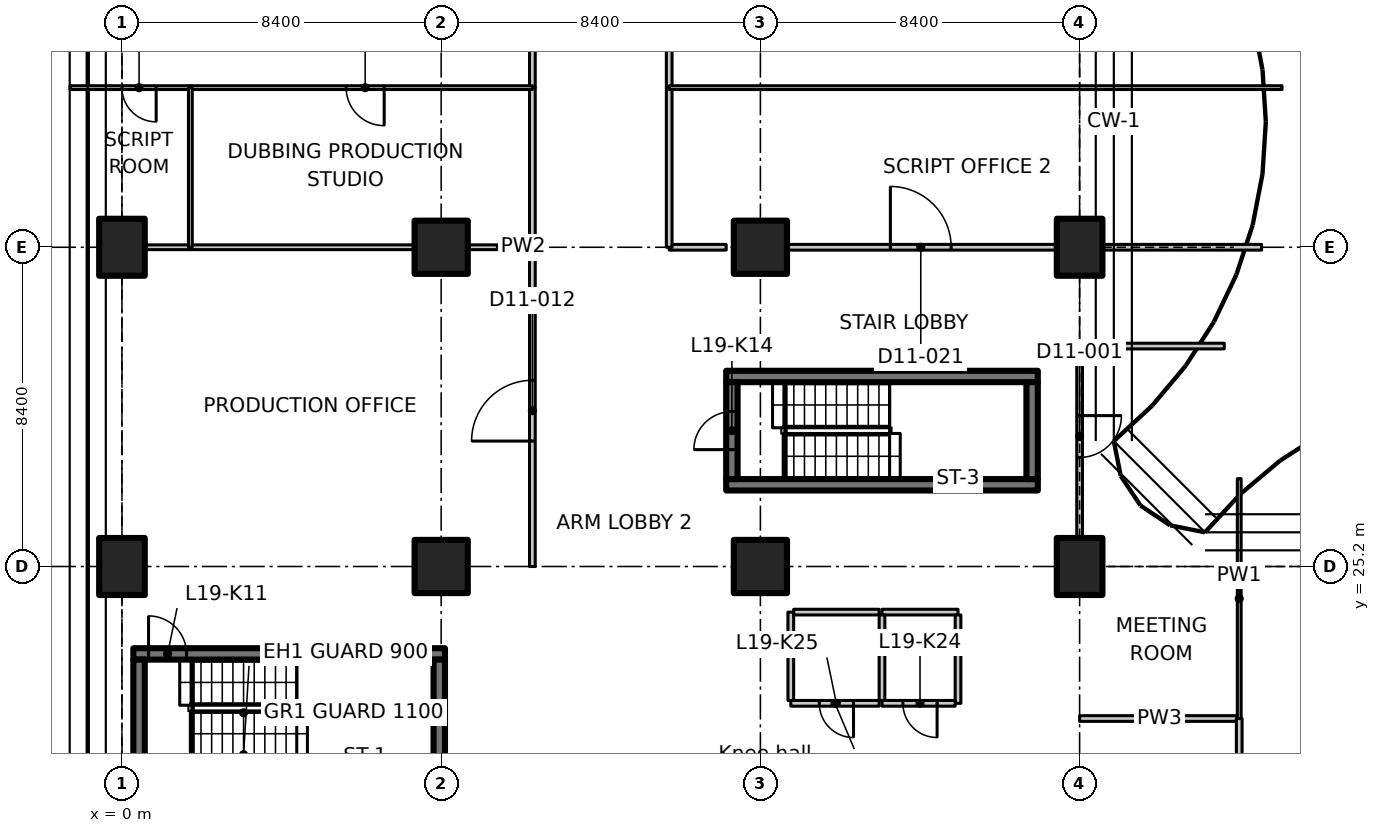
"""IFC4 building model, lengths in metres.
Left out: names, types, materials, properties, quantities, classifications, styles, units other than length and angle.
Written with IfcOpenShell. Run it as: python <this file> out.ifc"""

import sys

from ifc_helpers import new_model, si_unit, direction, frame, frame_2d, origin, origin_2d, place, context, subcontext, project, spatial, polyline, rectangle, outline, extrude, element, fill, save


model = new_model("IFC4")
c1 = context("Model", 3, precision=1e-05, world=origin(), true_north=direction((0.0, 1.0)))
c2 = subcontext(c1, "Body", "Model", "MODEL_VIEW")
j1 = project(units=[si_unit("LENGTHUNIT", "METRE"), si_unit("PLANEANGLEUNIT", "RADIAN")], contexts=[c1])
p1 = place(None, origin())
s1 = spatial("IfcSite", under=j1, at=p1, CompositionType="ELEMENT")
p2 = place(p1, origin())
s2 = spatial("IfcBuilding", under=s1, at=p2, CompositionType="ELEMENT")
p3 = place(p2, frame((0.0, 0.0, 83.3)))
s3 = spatial("IfcBuildingStorey", under=s2, at=p3, CompositionType="ELEMENT", Elevation=83.3)
for number, where, z_axis, x_axis in (
    (1, (0.0, 25.2, 0.0), (0.0, 0.0, 1.0), (1.0, 0.0, 0.0)),
    (2, (0.0, 33.6, 0.0), (0.0, 0.0, 1.0), (1.0, 0.0, 0.0)),
):
    element("IfcColumn", number, at=place(p3, frame(where, z_axis=z_axis, x_axis=x_axis)), inside=s3, PredefinedType="COLUMN", context=c2, shape_type="SweptSolid", body=[
        extrude(rectangle(XDim=1.2, YDim=1.5, at=origin_2d()), origin(), (0.0, 0.0, 1.0), 3.3),
    ])
for number, where, z_axis, x_axis in (
    (3, (8.4, 25.2, 0.0), (0.0, 0.0, 1.0), (1.0, 0.0, 0.0)),
    (4, (8.4, 33.6, 0.0), (0.0, 0.0, 1.0), (1.0, 0.0, 0.0)),
    (5, (16.8, 25.2, 0.0), (0.0, 0.0, 1.0), (1.0, 0.0, 0.0)),
    (6, (16.8, 33.6, 0.0), (0.0, 0.0, 1.0), (1.0, 0.0, 0.0)),
):
    element("IfcColumn", number, at=place(p3, frame(where, z_axis=z_axis, x_axis=x_axis)), inside=s3, PredefinedType="COLUMN", context=c2, shape_type="SweptSolid", body=[
        extrude(rectangle(XDim=1.4, YDim=1.4, at=origin_2d()), origin(), (0.0, 0.0, 1.0), 3.3),
    ])
for number, where, z_axis, x_axis in (
    (7, (25.2, 25.2, 0.0), (0.0, 0.0, 1.0), (1.0, 0.0, 0.0)),
    (8, (25.2, 33.6, 0.0), (0.0, 0.0, 1.0), (1.0, 0.0, 0.0)),
):
    element("IfcColumn", number, at=place(p3, frame(where, z_axis=z_axis, x_axis=x_axis)), inside=s3, PredefinedType="COLUMN", context=c2, shape_type="SweptSolid", body=[
        extrude(rectangle(XDim=1.2, YDim=1.5, at=origin_2d()), origin(), (0.0, 0.0, 1.0), 3.3),
    ])
p4 = place(p3, frame((0.3, 22.9, 0.0), z_axis=(0.0, 0.0, 1.0), x_axis=(1.0, 0.0, 0.0)))
e9 = element("IfcWall", 9, at=p4, inside=s3, PredefinedType="SHEAR", context=c2, shape_type="SweptSolid", body=[
    extrude(rectangle(XDim=8.2, YDim=0.3, at=frame_2d((4.1, 0.0))), origin(), (0.0, 0.0, 1.0), 3.3),
])
p5 = place(p4, frame((0.4, 0.0, 0.0)))
e10 = element("IfcOpeningElement", 10, at=p5, cuts=e9, PredefinedType="OPENING", context=c2, shape_type="SweptSolid", body=[
    extrude(rectangle(XDim=1.0, YDim=2.1, at=frame_2d((0.5, 1.05))), frame((0.0, 0.16, 0.0), z_axis=(0.0, -1.0, 0.0), x_axis=(1.0, 0.0, 0.0)), (0.0, 0.0, 1.0), 0.32),
])
for number, where, z_axis, x_axis in (
    (11, (0.45, 20.2, 0.0), (0.0, 0.0, 1.0), (0.0, 1.0, 0.0)),
    (12, (8.35, 20.2, 0.0), (0.0, 0.0, 1.0), (0.0, 1.0, 0.0)),
):
    element("IfcWall", number, at=place(p3, frame(where, z_axis=z_axis, x_axis=x_axis)), inside=s3, PredefinedType="SHEAR", context=c2, shape_type="SweptSolid", body=[
        extrude(rectangle(XDim=2.55, YDim=0.3, at=frame_2d((1.275, 0.0))), origin(), (0.0, 0.0, 1.0), 3.3),
    ])
for number, where, z_axis, x_axis in (
    (13, (15.9, 27.35, 0.0), (0.0, 0.0, 1.0), (1.0, 0.0, 0.0)),
    (14, (15.9, 30.2, 0.0), (0.0, 0.0, 1.0), (1.0, 0.0, 0.0)),
):
    element("IfcWall", number, at=place(p3, frame(where, z_axis=z_axis, x_axis=x_axis)), inside=s3, PredefinedType="SHEAR", context=c2, shape_type="SweptSolid", body=[
        extrude(rectangle(XDim=8.2, YDim=0.3, at=frame_2d((4.1, 0.0))), origin(), (0.0, 0.0, 1.0), 3.3),
    ])
p6 = place(p3, frame((16.05, 27.5, 0.0), z_axis=(0.0, 0.0, 1.0), x_axis=(0.0, 1.0, 0.0)))
e15 = element("IfcWall", 15, at=p6, inside=s3, PredefinedType="SHEAR", context=c2, shape_type="SweptSolid", body=[
    extrude(rectangle(XDim=2.55, YDim=0.3, at=frame_2d((1.275, 0.0))), origin(), (0.0, 0.0, 1.0), 3.3),
])
p7 = place(p6, frame((0.775, 0.0, 0.0)))
e16 = element("IfcOpeningElement", 16, at=p7, cuts=e15, PredefinedType="OPENING", context=c2, shape_type="SweptSolid", body=[
    extrude(rectangle(XDim=1.0, YDim=2.1, at=frame_2d((0.5, 1.05))), frame((0.0, 0.16, 0.0), z_axis=(0.0, -1.0, 0.0), x_axis=(1.0, 0.0, 0.0)), (0.0, 0.0, 1.0), 0.32),
])
p8 = place(p3, frame((23.95, 27.5, 0.0), z_axis=(0.0, 0.0, 1.0), x_axis=(0.0, 1.0, 0.0)))
e17 = element("IfcWall", 17, at=p8, inside=s3, PredefinedType="SHEAR", context=c2, shape_type="SweptSolid", body=[
    extrude(rectangle(XDim=2.55, YDim=0.3, at=frame_2d((1.275, 0.0))), origin(), (0.0, 0.0, 1.0), 3.3),
])
p9 = place(p3, frame((20.0, 24.0, 0.0), z_axis=(0.0, 0.0, 1.0), x_axis=(1.0, 0.0, 0.0)))
e18 = element("IfcWall", 18, at=p9, inside=s3, PredefinedType="PARTITIONING", context=c2, shape_type="SweptSolid", body=[
    extrude(rectangle(XDim=2.0, YDim=0.15, at=frame_2d((1.0, 0.0))), origin(), (0.0, 0.0, 1.0), 3.3),
])
p10 = place(p3, frame((22.0, 23.925, 0.0), z_axis=(0.0, 0.0, 1.0), x_axis=(0.0, -1.0, 0.0)))
e19 = element("IfcWall", 19, at=p10, inside=s3, PredefinedType="PARTITIONING", context=c2, shape_type="SweptSolid", body=[
    extrude(rectangle(XDim=2.325, YDim=0.15, at=frame_2d((1.163, 0.0))), origin(), (0.0, 0.0, 1.0), 3.3),
])
p11 = place(p3, frame((21.925, 21.6, 0.0), z_axis=(0.0, 0.0, 1.0), x_axis=(-1.0, 0.0, 0.0)))
e20 = element("IfcWall", 20, at=p11, inside=s3, PredefinedType="PARTITIONING", context=c2, shape_type="SweptSolid", body=[
    extrude(rectangle(XDim=1.925, YDim=0.15, at=frame_2d((0.962, 0.0))), origin(), (0.0, 0.0, 1.0), 3.3),
])
p12 = place(p11, frame((0.475, 0.0, 0.0)))
e21 = element("IfcOpeningElement", 21, at=p12, cuts=e20, PredefinedType="OPENING", context=c2, shape_type="SweptSolid", body=[
    extrude(rectangle(XDim=0.9, YDim=2.1, at=frame_2d((0.45, 1.05))), frame((0.0, 0.085, 0.0), z_axis=(0.0, -1.0, 0.0), x_axis=(1.0, 0.0, 0.0)), (0.0, 0.0, 1.0), 0.17),
])
p13 = place(p3, frame((20.0, 21.675, 0.0), z_axis=(0.0, 0.0, 1.0), x_axis=(0.0, 1.0, 0.0)))
e22 = element("IfcWall", 22, at=p13, inside=s3, PredefinedType="PARTITIONING", context=c2, shape_type="SweptSolid", body=[
    extrude(rectangle(XDim=2.25, YDim=0.15, at=frame_2d((1.125, 0.0))), origin(), (0.0, 0.0, 1.0), 3.3),
])
p14 = place(p3, frame((19.925, 21.6, 0.0), z_axis=(0.0, 0.0, 1.0), x_axis=(-1.0, 0.0, 0.0)))
e23 = element("IfcWall", 23, at=p14, inside=s3, PredefinedType="PARTITIONING", context=c2, shape_type="SweptSolid", body=[
    extrude(rectangle(XDim=2.325, YDim=0.15, at=frame_2d((1.163, 0.0))), origin(), (0.0, 0.0, 1.0), 3.3),
])
p15 = place(p14, frame((0.675, 0.0, 0.0)))
e24 = element("IfcOpeningElement", 24, at=p15, cuts=e23, PredefinedType="OPENING", context=c2, shape_type="SweptSolid", body=[
    extrude(rectangle(XDim=0.9, YDim=2.1, at=frame_2d((0.45, 1.05))), frame((0.0, 0.085, 0.0), z_axis=(0.0, -1.0, 0.0), x_axis=(1.0, 0.0, 0.0)), (0.0, 0.0, 1.0), 0.17),
])
p16 = place(p3, frame((17.6, 21.675, 0.0), z_axis=(0.0, 0.0, 1.0), x_axis=(0.0, 1.0, 0.0)))
e25 = element("IfcWall", 25, at=p16, inside=s3, PredefinedType="PARTITIONING", context=c2, shape_type="SweptSolid", body=[
    extrude(rectangle(XDim=2.325, YDim=0.15, at=frame_2d((1.163, 0.0))), origin(), (0.0, 0.0, 1.0), 3.3),
])
p17 = place(p3, frame((17.675, 24.0, 0.0), z_axis=(0.0, 0.0, 1.0), x_axis=(1.0, 0.0, 0.0)))
e26 = element("IfcWall", 26, at=p17, inside=s3, PredefinedType="PARTITIONING", context=c2, shape_type="SweptSolid", body=[
    extrude(rectangle(XDim=2.25, YDim=0.15, at=frame_2d((1.125, 0.0))), origin(), (0.0, 0.0, 1.0), 3.3),
])
p18 = place(p3, frame((25.2, 21.2, 0.0), z_axis=(0.0, 0.0, 1.0), x_axis=(1.0, 0.0, 0.0)))
e27 = element("IfcWall", 27, at=p18, inside=s3, PredefinedType="PARTITIONING", context=c2, shape_type="SweptSolid", body=[
    extrude(rectangle(XDim=4.2, YDim=0.15, at=frame_2d((2.1, 0.0))), origin(), (0.0, 0.0, 1.0), 3.28),
])
p19 = place(p3, frame((29.4, 21.2, 0.0), z_axis=(0.0, 0.0, 1.0), x_axis=(0.0, -1.0, 0.0)))
e28 = element("IfcWall", 28, at=p19, inside=s3, PredefinedType="PARTITIONING", context=c2, shape_type="SweptSolid", body=[
    extrude(rectangle(XDim=8.2, YDim=0.15, at=frame_2d((4.1, 0.0))), origin(), (0.0, 0.0, 1.0), 3.28),
])
p20 = place(p3, frame((29.4, 27.511, 0.0), z_axis=(0.0, 0.0, 1.0), x_axis=(0.0, -1.0, 0.0)))
e29 = element("IfcWall", 29, at=p20, inside=s3, PredefinedType="PARTITIONING", context=c2, shape_type="SweptSolid", body=[
    extrude(outline(polyline([(0.0, 0.0), (6.311, 0.0), (6.311, 3.28), (2.761, 3.28), (2.759, 2.93), (1.863, 2.93), (1.861, 3.28), (0.236, 3.28), (0.0, 3.28), (0.0, 0.0)])), frame((0.0, 0.05, 0.0), z_axis=(0.0, -1.0, 0.0), x_axis=(1.0, 0.0, 0.0)), (0.0, 0.0, 1.0), 0.1),
])
p21 = place(p3, frame((25.2, 31.0, 0.0), z_axis=(0.0, 0.0, 1.0), x_axis=(0.0, -1.0, 0.0)))
e30 = element("IfcWall", 30, at=p21, inside=s3, PredefinedType="PARTITIONING", context=c2, shape_type="SweptSolid", body=[
    extrude(outline(polyline([(0.0, 0.0), (5.03, 0.0), (5.03, 2.93), (0.0, 2.93), (0.0, 0.0)])), frame((0.0, 0.075, 0.0), z_axis=(0.0, -1.0, 0.0), x_axis=(1.0, 0.0, 0.0)), (0.0, 0.0, 1.0), 0.15),
])
p22 = place(p21, frame((1.83, 0.0, 0.0)))
e31 = element("IfcOpeningElement", 31, at=p22, cuts=e30, PredefinedType="OPENING", context=c2, shape_type="SweptSolid", body=[
    extrude(rectangle(XDim=1.1, YDim=2.1, at=frame_2d((0.55, 1.05))), frame((0.0, 0.085, 0.0), z_axis=(0.0, -1.0, 0.0), x_axis=(1.0, 0.0, 0.0)), (0.0, 0.0, 1.0), 0.17),
])
p23 = place(p3, frame((25.2, 31.0, 0.0), z_axis=(0.0, 0.0, 1.0), x_axis=(1.0, 0.0, 0.0)))
e32 = element("IfcWall", 32, at=p23, inside=s3, PredefinedType="PARTITIONING", context=c2, shape_type="SweptSolid", body=[
    extrude(rectangle(XDim=3.806, YDim=0.15, at=frame_2d((1.903, 0.0))), origin(), (0.0, 0.0, 1.0), 2.93),
])
p24 = place(p3, frame((10.8, 25.2, 0.0), z_axis=(0.0, 0.0, 1.0), x_axis=(0.0, 1.0, 0.0)))
e33 = element("IfcWall", 33, at=p24, inside=s3, PredefinedType="PARTITIONING", context=c2, shape_type="SweptSolid", body=[
    extrude(rectangle(XDim=8.4, YDim=0.15, at=frame_2d((4.2, 0.0))), origin(), (0.0, 0.0, 1.0), 3.28),
])
p25 = place(p24, frame((3.3, 0.0, 0.0)))
e34 = element("IfcOpeningElement", 34, at=p25, cuts=e33, PredefinedType="OPENING", context=c2, shape_type="SweptSolid", body=[
    extrude(rectangle(XDim=1.6, YDim=2.1, at=frame_2d((0.8, 1.05))), frame((0.0, 0.085, 0.0), z_axis=(0.0, -1.0, 0.0), x_axis=(1.0, 0.0, 0.0)), (0.0, 0.0, 1.0), 0.17),
])
p26 = place(p3, frame((14.4, 33.6, 0.0), z_axis=(0.0, 0.0, 1.0), x_axis=(1.0, 0.0, 0.0)))
e35 = element("IfcWall", 35, at=p26, inside=s3, PredefinedType="PARTITIONING", context=c2, shape_type="SweptSolid", body=[
    extrude(rectangle(XDim=1.5, YDim=0.15, at=frame_2d((0.75, 0.0))), origin(), (0.0, 0.0, 1.0), 3.28),
])
p27 = place(p3, frame((17.52, 33.6, 0.0), z_axis=(0.0, 0.0, 1.0), x_axis=(1.0, 0.0, 0.0)))
e36 = element("IfcWall", 36, at=p27, inside=s3, PredefinedType="PARTITIONING", context=c2, shape_type="SweptSolid", body=[
    extrude(rectangle(XDim=7.06, YDim=0.15, at=frame_2d((3.53, 0.0))), origin(), (0.0, 0.0, 1.0), 3.28),
])
p28 = place(p27, frame((2.7, 0.0, 0.0)))
e37 = element("IfcOpeningElement", 37, at=p28, cuts=e36, PredefinedType="OPENING", context=c2, shape_type="SweptSolid", body=[
    extrude(rectangle(XDim=1.6, YDim=2.1, at=frame_2d((0.8, 1.05))), frame((0.0, 0.085, 0.0), z_axis=(0.0, -1.0, 0.0), x_axis=(1.0, 0.0, 0.0)), (0.0, 0.0, 1.0), 0.17),
])
p29 = place(p3, frame((25.82, 33.6, 0.0), z_axis=(0.0, 0.0, 1.0), x_axis=(1.0, 0.0, 0.0)))
e38 = element("IfcWall", 38, at=p29, inside=s3, PredefinedType="PARTITIONING", context=c2, shape_type="SweptSolid", body=[
    extrude(rectangle(XDim=4.168, YDim=0.15, at=frame_2d((2.084, 0.0))), origin(), (0.0, 0.0, 1.0), 2.93),
])
p30 = place(p3, frame((10.8, 37.8, 0.0), z_axis=(0.0, 0.0, 1.0), x_axis=(0.0, 1.0, 0.0)))
e39 = element("IfcWall", 39, at=p30, inside=s3, PredefinedType="PARTITIONING", context=c2, shape_type="SweptSolid", body=[
    extrude(rectangle(XDim=8.4, YDim=0.15, at=frame_2d((4.2, 0.0))), origin(), (0.0, 0.0, 1.0), 3.28),
])
p31 = place(p30, frame((3.3, 0.0, 0.0)))
e40 = element("IfcOpeningElement", 40, at=p31, cuts=e39, PredefinedType="OPENING", context=c2, shape_type="SweptSolid", body=[
    extrude(rectangle(XDim=1.6, YDim=2.1, at=frame_2d((0.8, 1.05))), frame((0.0, 0.085, 0.0), z_axis=(0.0, -1.0, 0.0), x_axis=(1.0, 0.0, 0.0)), (0.0, 0.0, 1.0), 0.17),
])
for number, where, z_axis, x_axis in (
    (41, (10.8, 33.6, 0.0), (0.0, 0.0, 1.0), (0.0, 1.0, 0.0)),
    (42, (14.4, 37.8, 0.0), (0.0, 0.0, 1.0), (0.0, -1.0, 0.0)),
):
    element("IfcWall", number, at=place(p3, frame(where, z_axis=z_axis, x_axis=x_axis)), inside=s3, PredefinedType="PARTITIONING", context=c2, shape_type="SweptSolid", body=[
        extrude(rectangle(XDim=4.2, YDim=0.15, at=frame_2d((2.1, 0.0))), origin(), (0.0, 0.0, 1.0), 3.28),
    ])
p32 = place(p3, frame((14.4, 54.6, 0.0), z_axis=(0.0, 0.0, 1.0), x_axis=(0.0, -1.0, 0.0)))
e43 = element("IfcWall", 43, at=p32, inside=s3, PredefinedType="PARTITIONING", context=c2, shape_type="SweptSolid", body=[
    extrude(rectangle(XDim=16.8, YDim=0.15, at=frame_2d((8.4, 0.0))), origin(), (0.0, 0.0, 1.0), 3.28),
])
p33 = place(p32, frame((7.5, 0.0, 0.0)))
e44 = element("IfcOpeningElement", 44, at=p33, cuts=e43, PredefinedType="OPENING", context=c2, shape_type="SweptSolid", body=[
    extrude(rectangle(XDim=2.0, YDim=2.4, at=frame_2d((1.0, 1.2))), frame((0.0, 0.085, 0.0), z_axis=(0.0, -1.0, 0.0), x_axis=(1.0, 0.0, 0.0)), (0.0, 0.0, 1.0), 0.17),
])
p34 = place(p3, frame((0.62, 33.6, 0.0), z_axis=(0.0, 0.0, 1.0), x_axis=(1.0, 0.0, 0.0)))
e45 = element("IfcWall", 45, at=p34, inside=s3, PredefinedType="PARTITIONING", context=c2, shape_type="SweptSolid", body=[
    extrude(rectangle(XDim=1.18, YDim=0.125, at=frame_2d((0.59, 0.0))), origin(), (0.0, 0.0, 1.0), 3.28),
])
p35 = place(p3, frame((1.8, 33.6, 0.0), z_axis=(0.0, 0.0, 1.0), x_axis=(1.0, 0.0, 0.0)))
e46 = element("IfcWall", 46, at=p35, inside=s3, PredefinedType="PARTITIONING", context=c2, shape_type="SweptSolid", body=[
    extrude(rectangle(XDim=5.88, YDim=0.125, at=frame_2d((2.94, 0.0))), origin(), (0.0, 0.0, 1.0), 3.28),
])
p36 = place(p3, frame((9.12, 33.6, 0.0), z_axis=(0.0, 0.0, 1.0), x_axis=(1.0, 0.0, 0.0)))
e47 = element("IfcWall", 47, at=p36, inside=s3, PredefinedType="PARTITIONING", context=c2, shape_type="SweptSolid", body=[
    extrude(rectangle(XDim=1.68, YDim=0.125, at=frame_2d((0.84, 0.0))), origin(), (0.0, 0.0, 1.0), 3.28),
])
p37 = place(p3, frame((1.8, 37.8, 0.0), z_axis=(0.0, 0.0, 1.0), x_axis=(-1.0, 0.0, 0.0)))
e48 = element("IfcWall", 48, at=p37, inside=s3, PredefinedType="PARTITIONING", context=c2, shape_type="SweptSolid", body=[
    extrude(rectangle(XDim=3.165, YDim=0.1, at=frame_2d((1.583, 0.0))), origin(), (0.0, 0.0, 1.0), 2.93),
])
p38 = place(p37, frame((0.9, 0.0, 0.0)))
e49 = element("IfcOpeningElement", 49, at=p38, cuts=e48, PredefinedType="OPENING", context=c2, shape_type="SweptSolid", body=[
    extrude(rectangle(XDim=0.9, YDim=2.1, at=frame_2d((0.45, 1.05))), frame((0.0, 0.06, 0.0), z_axis=(0.0, -1.0, 0.0), x_axis=(1.0, 0.0, 0.0)), (0.0, 0.0, 1.0), 0.12),
])
p39 = place(p3, frame((10.8, 37.8, 0.0), z_axis=(0.0, 0.0, 1.0), x_axis=(-1.0, 0.0, 0.0)))
e50 = element("IfcWall", 50, at=p39, inside=s3, PredefinedType="PARTITIONING", context=c2, shape_type="SweptSolid", body=[
    extrude(rectangle(XDim=9.0, YDim=0.1, at=frame_2d((4.5, 0.0))), origin(), (0.0, 0.0, 1.0), 3.28),
])
p40 = place(p39, frame((3.9, 0.0, 0.0)))
e51 = element("IfcOpeningElement", 51, at=p40, cuts=e50, PredefinedType="OPENING", context=c2, shape_type="SweptSolid", body=[
    extrude(rectangle(XDim=1.0, YDim=2.1, at=frame_2d((0.5, 1.05))), frame((0.0, 0.06, 0.0), z_axis=(0.0, -1.0, 0.0), x_axis=(1.0, 0.0, 0.0)), (0.0, 0.0, 1.0), 0.12),
])
p41 = place(p3, frame((1.8, 37.8, 0.0), z_axis=(0.0, 0.0, 1.0), x_axis=(0.0, -1.0, 0.0)))
e52 = element("IfcWall", 52, at=p41, inside=s3, PredefinedType="PARTITIONING", context=c2, shape_type="SweptSolid", body=[
    extrude(rectangle(XDim=4.2, YDim=0.1, at=frame_2d((2.1, 0.0))), origin(), (0.0, 0.0, 1.0), 3.28),
])
p42 = place(p3, frame((14.4, 37.8, 0.0), z_axis=(0.0, 0.0, 1.0), x_axis=(1.0, 0.0, 0.0)))
e53 = element("IfcWall", 53, at=p42, inside=s3, PredefinedType="PARTITIONING", context=c2, shape_type="SweptSolid", body=[
    extrude(outline(polyline([(0.0, 0.0), (16.126, 0.0), (16.126, 3.28), (15.843, 3.28), (11.25, 3.28), (11.248, 2.93), (10.352, 2.93), (10.35, 3.28), (0.0, 3.28), (0.0, 0.0)])), frame((0.0, 0.05, 0.0), z_axis=(0.0, -1.0, 0.0), x_axis=(1.0, 0.0, 0.0)), (0.0, 0.0, 1.0), 0.1),
])
p43 = place(p5, origin())
e54 = element("IfcDoor", 54, at=p43, inside=s3, OperationType="SINGLE_SWING_LEFT", PredefinedType="DOOR", context=c2, shape_type="SweptSolid", body=[
    extrude(rectangle(XDim=1.0, YDim=2.1, at=frame_2d((0.5, 1.05))), frame((0.0, 0.025, 0.0), z_axis=(0.0, -1.0, 0.0), x_axis=(1.0, 0.0, 0.0)), (0.0, 0.0, 1.0), 0.05),
])
fill(e10, e54)
p44 = place(p7, origin())
e55 = element("IfcDoor", 55, at=p44, inside=s3, OperationType="SINGLE_SWING_RIGHT", PredefinedType="DOOR", context=c2, shape_type="SweptSolid", body=[
    extrude(rectangle(XDim=1.0, YDim=2.1, at=frame_2d((0.5, 1.05))), frame((0.0, 0.025, 0.0), z_axis=(0.0, -1.0, 0.0), x_axis=(1.0, 0.0, 0.0)), (0.0, 0.0, 1.0), 0.05),
])
fill(e16, e55)
p45 = place(p12, origin())
e56 = element("IfcDoor", 56, at=p45, inside=s3, OperationType="SINGLE_SWING_RIGHT", PredefinedType="DOOR", context=c2, shape_type="SweptSolid", body=[
    extrude(rectangle(XDim=0.9, YDim=2.1, at=frame_2d((0.45, 1.05))), frame((0.0, 0.025, 0.0), z_axis=(0.0, -1.0, 0.0), x_axis=(1.0, 0.0, 0.0)), (0.0, 0.0, 1.0), 0.05),
])
fill(e21, e56)
p46 = place(p15, origin())
e57 = element("IfcDoor", 57, at=p46, inside=s3, OperationType="SINGLE_SWING_LEFT", PredefinedType="DOOR", context=c2, shape_type="SweptSolid", body=[
    extrude(rectangle(XDim=0.9, YDim=2.1, at=frame_2d((0.45, 1.05))), frame((0.0, 0.025, 0.0), z_axis=(0.0, -1.0, 0.0), x_axis=(1.0, 0.0, 0.0)), (0.0, 0.0, 1.0), 0.05),
])
fill(e24, e57)
p47 = place(p22, origin())
e58 = element("IfcDoor", 58, at=p47, inside=s3, OperationType="SINGLE_SWING_RIGHT", PredefinedType="DOOR", context=c2, shape_type="SweptSolid", body=[
    extrude(rectangle(XDim=1.1, YDim=2.1, at=frame_2d((0.55, 1.05))), frame((0.0, 0.025, 0.0), z_axis=(0.0, -1.0, 0.0), x_axis=(1.0, 0.0, 0.0)), (0.0, 0.0, 1.0), 0.05),
])
fill(e31, e58)
p48 = place(p25, origin())
e59 = element("IfcDoor", 59, at=p48, inside=s3, OperationType="DOUBLE_DOOR_SINGLE_SWING", PredefinedType="DOOR", context=c2, shape_type="SweptSolid", body=[
    extrude(rectangle(XDim=1.6, YDim=2.1, at=frame_2d((0.8, 1.05))), frame((0.0, 0.025, 0.0), z_axis=(0.0, -1.0, 0.0), x_axis=(1.0, 0.0, 0.0)), (0.0, 0.0, 1.0), 0.05),
])
fill(e34, e59)
p49 = place(p38, origin())
e60 = element("IfcDoor", 60, at=p49, inside=s3, OperationType="SINGLE_SWING_LEFT", PredefinedType="DOOR", context=c2, shape_type="SweptSolid", body=[
    extrude(rectangle(XDim=0.9, YDim=2.1, at=frame_2d((0.45, 1.05))), frame((0.0, 0.025, 0.0), z_axis=(0.0, -1.0, 0.0), x_axis=(1.0, 0.0, 0.0)), (0.0, 0.0, 1.0), 0.05),
])
fill(e49, e60)
p50 = place(p40, origin())
e61 = element("IfcDoor", 61, at=p50, inside=s3, OperationType="SINGLE_SWING_LEFT", PredefinedType="DOOR", context=c2, shape_type="SweptSolid", body=[
    extrude(rectangle(XDim=1.0, YDim=2.1, at=frame_2d((0.5, 1.05))), frame((0.0, 0.025, 0.0), z_axis=(0.0, -1.0, 0.0), x_axis=(1.0, 0.0, 0.0)), (0.0, 0.0, 1.0), 0.05),
])
fill(e51, e61)
p51 = place(p28, origin())
e62 = element("IfcDoor", 62, at=p51, inside=s3, OperationType="DOUBLE_DOOR_SINGLE_SWING", PredefinedType="DOOR", context=c2, shape_type="SweptSolid", body=[
    extrude(rectangle(XDim=1.6, YDim=2.1, at=frame_2d((0.8, 1.05))), frame((0.0, 0.025, 0.0), z_axis=(0.0, -1.0, 0.0), x_axis=(1.0, 0.0, 0.0)), (0.0, 0.0, 1.0), 0.05),
])
fill(e37, e62)
save(model, sys.argv[1])
